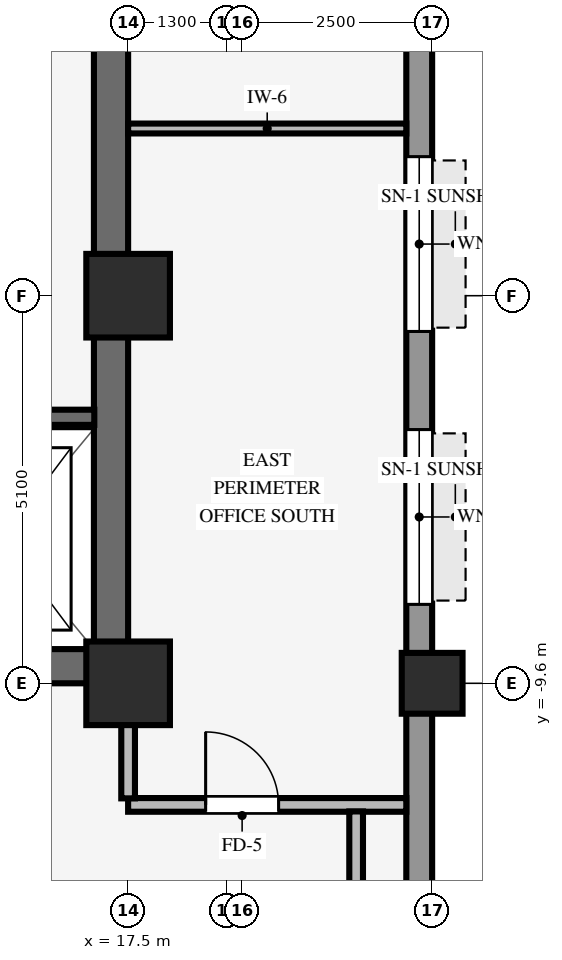
"""IFC4 building model, lengths in metres.
Left out: names, types, materials, properties, quantities, classifications, styles, units other than length and angle.
Written with IfcOpenShell. Run it as: python <this file> out.ifc"""

import sys

from ifc_helpers import new_model, si_unit, direction, frame, frame_2d, origin, origin_2d, place, context, subcontext, project, spatial, rectangle, hollow_rectangle, extrude, source, transform, mapped, element, fill, save


model = new_model("IFC4")
c1 = context("Model", 3, precision=1e-05, world=origin(), true_north=direction((0.0, 1.0)))
c2 = subcontext(c1, "Body", "Model", "MODEL_VIEW")
j1 = project(units=[si_unit("LENGTHUNIT", "METRE"), si_unit("PLANEANGLEUNIT", "RADIAN")], contexts=[c1])
p1 = place(None, origin())
s1 = spatial("IfcSite", under=j1, at=p1, CompositionType="ELEMENT")
p2 = place(p1, origin())
s2 = spatial("IfcBuilding", under=s1, at=p2, CompositionType="ELEMENT")
p3 = place(p2, frame((0.0, 0.0, 78.7)))
s3 = spatial("IfcBuildingStorey", under=s2, at=p3, CompositionType="ELEMENT", Elevation=78.7)
p4 = place(p3, frame((9.0, -9.375, 0.0), z_axis=(0.0, 0.0, 1.0), x_axis=(1.0, 0.0, 0.0)))
e1 = element("IfcWall", 1, at=p4, inside=s3, PredefinedType="SHEAR", context=c2, shape_type="SweptSolid", body=[
    extrude(rectangle(XDim=8.5, YDim=0.45, at=frame_2d((4.25, 0.0))), origin(), (0.0, 0.0, 1.0), 3.37),
])
p5 = place(p3, frame((17.275, -9.155, 0.0), z_axis=(0.0, 0.0, 1.0), x_axis=(0.0, 1.0, 0.0)))
e2 = element("IfcWall", 2, at=p5, inside=s3, PredefinedType="SHEAR", context=c2, shape_type="SweptSolid", body=[
    extrude(rectangle(XDim=18.31, YDim=0.45, at=frame_2d((9.155, 0.0))), origin(), (0.0, 0.0, 1.0), 3.37),
])
for number, where, z_axis, x_axis in (
    (3, (17.5, -9.6, 0.0), (0.0, 0.0, 1.0), (1.0, 0.0, 0.0)),
    (4, (17.5, -4.5, 0.0), (0.0, 0.0, 1.0), (1.0, 0.0, 0.0)),
):
    element("IfcColumn", number, at=place(p3, frame(where, z_axis=z_axis, x_axis=x_axis)), inside=s3, PredefinedType="COLUMN", context=c2, shape_type="SweptSolid", body=[
        extrude(rectangle(XDim=1.1, YDim=1.1, at=origin_2d()), origin(), (0.0, 0.0, 1.0), 3.37),
    ])
p6 = place(p3, frame((21.5, -9.6, 0.0), z_axis=(0.0, 0.0, 1.0), x_axis=(1.0, 0.0, 0.0)))
e5 = element("IfcColumn", 5, at=p6, inside=s3, PredefinedType="COLUMN", context=c2, shape_type="SweptSolid", body=[
    extrude(hollow_rectangle(XDim=0.8, YDim=0.8, WallThickness=0.055, InnerFilletRadius=0.055, OuterFilletRadius=0.11, at=origin_2d()), origin(), (0.0, 0.0, 1.0), 3.37),
])
p7 = place(p3, frame((21.33, -20.764, 0.0), z_axis=(0.0, 0.0, 1.0), x_axis=(0.0, 1.0, 0.0)))
e6 = element("IfcWall", 6, at=p7, inside=s3, PredefinedType="STANDARD", context=c2, shape_type="SweptSolid", body=[
    extrude(rectangle(XDim=41.528, YDim=0.34, at=frame_2d((20.764, 0.0))), origin(), (0.0, 0.0, 1.0), 2.705),
])
p8 = place(p7, frame((12.202, 0.0, 0.8)))
e7 = element("IfcOpeningElement", 7, at=p8, cuts=e6, PredefinedType="OPENING", context=c2, shape_type="SweptSolid", body=[
    extrude(rectangle(XDim=2.3, YDim=1.62, at=frame_2d((1.15, 0.81))), frame((0.0, 0.18, 0.0), z_axis=(0.0, -1.0, 0.0), x_axis=(1.0, 0.0, 0.0)), (0.0, 0.0, 1.0), 0.36),
])
p9 = place(p7, frame((15.793, 0.0, 0.8)))
e8 = element("IfcOpeningElement", 8, at=p9, cuts=e6, PredefinedType="OPENING", context=c2, shape_type="SweptSolid", body=[
    extrude(rectangle(XDim=2.3, YDim=1.62, at=frame_2d((1.15, 0.81))), frame((0.0, 0.18, 0.0), z_axis=(0.0, -1.0, 0.0), x_axis=(1.0, 0.0, 0.0)), (0.0, 0.0, 1.0), 0.36),
])
p10 = place(p7, frame((22.084, 0.0, 0.8)))
e9 = element("IfcOpeningElement", 9, at=p10, cuts=e6, PredefinedType="OPENING", context=c2, shape_type="SweptSolid", body=[
    extrude(rectangle(XDim=2.3, YDim=1.62, at=frame_2d((1.15, 0.81))), frame((0.0, 0.18, 0.0), z_axis=(0.0, -1.0, 0.0), x_axis=(1.0, 0.0, 0.0)), (0.0, 0.0, 1.0), 0.36),
])
p11 = place(p7, frame((27.025, 0.0, 0.8)))
e10 = element("IfcOpeningElement", 10, at=p11, cuts=e6, PredefinedType="OPENING", context=c2, shape_type="SweptSolid", body=[
    extrude(rectangle(XDim=2.3, YDim=1.62, at=frame_2d((1.15, 0.81))), frame((0.0, 0.18, 0.0), z_axis=(0.0, -1.0, 0.0), x_axis=(1.0, 0.0, 0.0)), (0.0, 0.0, 1.0), 0.36),
])
p12 = place(p3, frame((14.645, -6.1, 0.0), z_axis=(0.0, 0.0, 1.0), x_axis=(1.0, 0.0, 0.0)))
e11 = element("IfcWall", 11, at=p12, inside=s3, PredefinedType="SHEAR", context=c2, shape_type="SweptSolid", body=[
    extrude(rectangle(XDim=2.41, YDim=0.2, at=frame_2d((1.205, 0.0))), origin(), (0.0, 0.0, 1.0), 3.37),
])
p13 = place(p3, frame((17.5, -11.2, 0.0), z_axis=(0.0, 0.0, 1.0), x_axis=(1.0, 0.0, 0.0)))
e12 = element("IfcWall", 12, at=p13, inside=s3, PredefinedType="PARTITIONING", context=c2, shape_type="SweptSolid", body=[
    extrude(rectangle(XDim=3.66, YDim=0.18, at=frame_2d((1.83, 0.0))), origin(), (0.0, 0.0, 1.0), 3.36),
])
p14 = place(p13, frame((1.02, 0.0, 0.0)))
e13 = element("IfcOpeningElement", 13, at=p14, cuts=e12, PredefinedType="OPENING", context=c2, shape_type="SweptSolid", body=[
    extrude(rectangle(XDim=0.96, YDim=2.1, at=frame_2d((0.48, 1.05))), frame((0.0, 0.1, 0.0), z_axis=(0.0, -1.0, 0.0), x_axis=(1.0, 0.0, 0.0)), (0.0, 0.0, 1.0), 0.2),
])
p15 = place(p3, frame((17.5, -2.3, 0.0), z_axis=(0.0, 0.0, 1.0), x_axis=(1.0, 0.0, 0.0)))
e14 = element("IfcWall", 14, at=p15, inside=s3, PredefinedType="PARTITIONING", context=c2, shape_type="SweptSolid", body=[
    extrude(rectangle(XDim=3.66, YDim=0.13, at=frame_2d((1.83, 0.0))), origin(), (0.0, 0.0, 1.0), 3.36),
])
p16 = place(p3, frame((17.5, -11.114, 0.0), z_axis=(0.0, 0.0, 1.0), x_axis=(0.0, 1.0, 0.0)))
e15 = element("IfcWall", 15, at=p16, inside=s3, PredefinedType="PARTITIONING", context=c2, shape_type="SweptSolid", body=[
    extrude(rectangle(XDim=0.968, YDim=0.18, at=frame_2d((0.484, 0.0))), origin(), (0.0, 0.0, 1.0), 2.738),
])
p17 = place(p3, frame((20.5, -13.514, 0.0), z_axis=(0.0, 0.0, 1.0), x_axis=(0.0, 1.0, 0.0)))
e16 = element("IfcWall", 16, at=p17, inside=s3, PredefinedType="PARTITIONING", context=c2, shape_type="SweptSolid", body=[
    extrude(rectangle(XDim=2.228, YDim=0.18, at=frame_2d((1.114, 0.0))), origin(), (0.0, 0.0, 1.0), 3.36),
])
m1 = source(origin(), c2, "Body", "SweptSolid", [
    extrude(rectangle(XDim=2.3, YDim=1.62, at=frame_2d((1.15, 0.81))), frame((0.0, 0.03, 0.0), z_axis=(0.0, -1.0, 0.0), x_axis=(1.0, 0.0, 0.0)), (0.0, 0.0, 1.0), 0.06),
])
p18 = place(p8, origin())
e17 = element("IfcWindow", 17, at=p18, inside=s3, PartitioningType="SINGLE_PANEL", PredefinedType="WINDOW", context=c2, shape_type="MappedRepresentation", body=[
    mapped(m1, transform((0.0, 0.0, 0.0), scale=1.0)),
])
fill(e7, e17)
p19 = place(p9, origin())
e18 = element("IfcWindow", 18, at=p19, inside=s3, PartitioningType="SINGLE_PANEL", PredefinedType="WINDOW", context=c2, shape_type="MappedRepresentation", body=[
    mapped(m1, transform((0.0, 0.0, 0.0), scale=1.0)),
])
fill(e8, e18)
m2 = source(origin(), c2, "Body", "SweptSolid", [
    extrude(rectangle(XDim=0.96, YDim=2.1, at=frame_2d((0.48, 1.05))), frame((0.0, 0.025, 0.0), z_axis=(0.0, -1.0, 0.0), x_axis=(1.0, 0.0, 0.0)), (0.0, 0.0, 1.0), 0.05),
])
p20 = place(p14, origin())
e19 = element("IfcDoor", 19, at=p20, inside=s3, OperationType="SINGLE_SWING_LEFT", PredefinedType="DOOR", context=c2, shape_type="MappedRepresentation", body=[
    mapped(m2, transform((0.0, 0.0, 0.0), scale=1.0)),
])
fill(e13, e19)
save(model, sys.argv[1])
